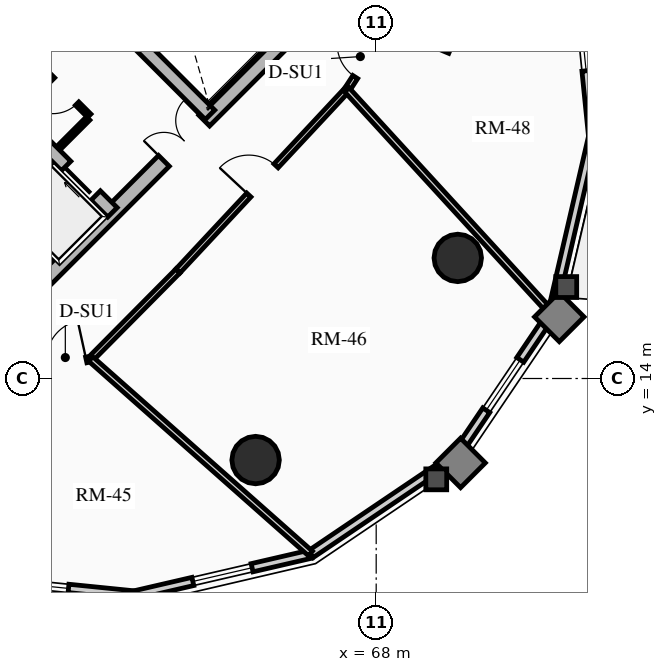
"""IFC4 building model, lengths in metres.
Left out: names, types, materials, properties, quantities, classifications, styles, units other than length and angle.
Written with IfcOpenShell. Run it as: python <this file> out.ifc"""

import sys

from ifc_helpers import new_model, si_unit, direction, frame, frame_2d, origin, origin_2d, place, context, subcontext, project, spatial, rectangle, circle, extrude, source, transform, mapped, element, fill, save


model = new_model("IFC4")
c1 = context("Model", 3, precision=1e-05, world=origin(), true_north=direction((0.0, 1.0)))
c2 = subcontext(c1, "Body", "Model", "MODEL_VIEW")
j1 = project(units=[si_unit("LENGTHUNIT", "METRE"), si_unit("PLANEANGLEUNIT", "RADIAN")], contexts=[c1])
p1 = place(None, origin())
s1 = spatial("IfcSite", under=j1, at=p1, CompositionType="ELEMENT")
p2 = place(p1, origin())
s2 = spatial("IfcBuilding", under=s1, at=p2, CompositionType="ELEMENT")
p3 = place(p2, frame((0.0, 0.0, 151.6)))
s3 = spatial("IfcBuildingStorey", under=s2, at=p3, CompositionType="ELEMENT", Elevation=151.6)
p4 = place(p3, frame((58.561, 15.873, 0.0), z_axis=(0.0, 0.0, 1.0), x_axis=(0.707106781187, 0.707106781187, 0.0)))
e1 = element("IfcWall", 1, at=p4, inside=s3, PredefinedType="SHEAR", context=c2, shape_type="SweptSolid", body=[
    extrude(rectangle(XDim=10.7, YDim=0.4, at=frame_2d((5.35, 0.0))), origin(), (0.0, 0.0, 1.0), 2.91),
])
m1 = source(origin(), c2, "Body", "SweptSolid", [
    extrude(rectangle(XDim=1.5, YDim=2.02, at=frame_2d((0.75, 1.01))), frame((0.0, 0.21, 0.0), z_axis=(0.0, -1.0, 0.0), x_axis=(1.0, 0.0, 0.0)), (0.0, 0.0, 1.0), 0.42),
])
p5 = place(p4, frame((5.45, 0.0, 0.0)))
e2 = element("IfcOpeningElement", 2, at=p5, cuts=e1, PredefinedType="OPENING", context=c2, shape_type="MappedRepresentation", body=[
    mapped(m1, transform((0.0, 0.0, 0.0), x_axis=(1.0, 0.0, 0.0), y_axis=(0.0, 1.0, 0.0), z_axis=(0.0, 0.0, 1.0), scale=1.0)),
])
p6 = place(p3, frame((61.06, 18.373, 0.0), z_axis=(0.0, 0.0, 1.0), x_axis=(-0.707106781187, 0.707106781187, 0.0)))
e3 = element("IfcWall", 3, at=p6, inside=s3, PredefinedType="SHEAR", context=c2, shape_type="SweptSolid", body=[
    extrude(rectangle(XDim=13.7, YDim=0.35, at=frame_2d((6.85, 0.0))), origin(), (0.0, 0.0, 1.0), 2.91),
])
m2 = source(origin(), c2, "Body", "SweptSolid", [
    extrude(rectangle(XDim=1.1, YDim=2.015, at=frame_2d((0.55, 1.007))), frame((0.0, 0.185, 0.0), z_axis=(0.0, -1.0, 0.0), x_axis=(1.0, 0.0, 0.0)), (0.0, 0.0, 1.0), 0.37),
])
p7 = place(p6, frame((4.85, 0.0, 0.0)))
e4 = element("IfcOpeningElement", 4, at=p7, cuts=e3, PredefinedType="OPENING", context=c2, shape_type="MappedRepresentation", body=[
    mapped(m2, transform((0.0, 0.0, 0.0), x_axis=(1.0, 0.0, 0.0), y_axis=(0.0, 1.0, 0.0), z_axis=(0.0, 0.0, 1.0), scale=1.0)),
])
p8 = place(p6, frame((0.625, 0.0, 0.0)))
e5 = element("IfcOpeningElement", 5, at=p8, cuts=e3, PredefinedType="OPENING", context=c2, shape_type="MappedRepresentation", body=[
    mapped(m2, transform((0.0, 0.0, 0.0), x_axis=(1.0, 0.0, 0.0), y_axis=(0.0, 1.0, 0.0), z_axis=(0.0, 0.0, 1.0), scale=1.0)),
])
p9 = place(p6, frame((2.625, 0.0, 0.0)))
e6 = element("IfcOpeningElement", 6, at=p9, cuts=e3, PredefinedType="OPENING", context=c2, shape_type="MappedRepresentation", body=[
    mapped(m2, transform((0.0, 0.0, 0.0), x_axis=(1.0, 0.0, 0.0), y_axis=(0.0, 1.0, 0.0), z_axis=(0.0, 0.0, 1.0), scale=1.0)),
])
m3 = source(origin(), c2, "Body", "SweptSolid", [
    extrude(rectangle(XDim=1.15, YDim=2.02, at=frame_2d((0.575, 1.01))), frame((0.0, 0.185, 0.0), z_axis=(0.0, -1.0, 0.0), x_axis=(1.0, 0.0, 0.0)), (0.0, 0.0, 1.0), 0.37),
])
p10 = place(p6, frame((7.27, 0.0, 0.0)))
e7 = element("IfcOpeningElement", 7, at=p10, cuts=e3, PredefinedType="OPENING", context=c2, shape_type="MappedRepresentation", body=[
    mapped(m3, transform((0.0, 0.0, 0.0), x_axis=(1.0, 0.0, 0.0), y_axis=(0.0, 1.0, 0.0), z_axis=(0.0, 0.0, 1.0), scale=1.0)),
])
p11 = place(p3, frame((63.627, 20.94, 0.0), z_axis=(0.0, 0.0, 1.0), x_axis=(-0.707119496762, 0.707094065383, 0.0)))
e8 = element("IfcWall", 8, at=p11, inside=s3, PredefinedType="SHEAR", context=c2, shape_type="SweptSolid", body=[
    extrude(rectangle(XDim=9.6, YDim=0.35, at=frame_2d((4.8, 0.0))), origin(), (0.0, 0.0, 1.0), 2.91),
])
p12 = place(p11, frame((5.28, 0.0, 0.0)))
e9 = element("IfcOpeningElement", 9, at=p12, cuts=e8, PredefinedType="OPENING", context=c2, shape_type="MappedRepresentation", body=[
    mapped(m3, transform((0.0, 0.0, 0.0), x_axis=(1.0, 0.0, 0.0), y_axis=(0.0, 1.0, 0.0), z_axis=(0.0, 0.0, 1.0), scale=1.0)),
])
for number, where, z_axis, x_axis in (
    (10, (64.827, 11.854, 0.0), (0.0, 0.0, 1.0), (1.0, 0.0, 0.0)),
    (11, (70.146, 17.173, 0.0), (0.0, 0.0, 1.0), (1.0, 0.0, 0.0)),
):
    element("IfcColumn", number, at=place(p3, frame(where, z_axis=z_axis, x_axis=x_axis)), inside=s3, PredefinedType="USERDEFINED", context=c2, shape_type="SweptSolid", body=[
        extrude(circle(Radius=0.625, at=origin_2d()), origin(), (0.0, 0.0, 1.0), 2.91),
    ])
p13 = place(p3, frame((61.633, 8.302, 0.0), z_axis=(0.0, 0.0, 1.0), x_axis=(-0.994959267396, 0.100279889424, 0.0)))
e12 = element("IfcWall", 12, at=p13, inside=s3, PredefinedType="SOLIDWALL", context=c2, shape_type="SweptSolid", body=[
    extrude(rectangle(XDim=5.076, YDim=0.22, at=frame_2d((2.538, 0.0))), origin(), (0.0, 0.0, 1.0), 2.245),
])
m4 = source(origin(), c2, "Body", "SweptSolid", [
    extrude(rectangle(XDim=1.6, YDim=1.3, at=frame_2d((0.8, 0.65))), frame((0.0, 0.12, 0.0), z_axis=(0.0, -1.0, 0.0), x_axis=(1.0, 0.0, 0.0)), (0.0, 0.0, 1.0), 0.24),
])
p14 = place(p13, frame((1.738, 0.0, 0.65)))
e13 = element("IfcOpeningElement", 13, at=p14, cuts=e12, PredefinedType="OPENING", context=c2, shape_type="MappedRepresentation", body=[
    mapped(m4, transform((0.0, 0.0, 0.0), x_axis=(1.0, 0.0, 0.0), y_axis=(0.0, 1.0, 0.0), z_axis=(0.0, 0.0, 1.0), scale=1.0)),
])
p15 = place(p3, frame((66.279, 9.378, 0.0), z_axis=(0.0, 0.0, 1.0), x_axis=(-0.974206226622, -0.225659540039, 0.0)))
e14 = element("IfcWall", 14, at=p15, inside=s3, PredefinedType="SOLIDWALL", context=c2, shape_type="SweptSolid", body=[
    extrude(rectangle(XDim=4.769, YDim=0.22, at=frame_2d((2.385, 0.0))), origin(), (0.0, 0.0, 1.0), 2.245),
])
p16 = place(p15, frame((1.585, 0.0, 0.65)))
e15 = element("IfcOpeningElement", 15, at=p16, cuts=e14, PredefinedType="OPENING", context=c2, shape_type="MappedRepresentation", body=[
    mapped(m4, transform((0.0, 0.0, 0.0), x_axis=(1.0, 0.0, 0.0), y_axis=(0.0, 1.0, 0.0), z_axis=(0.0, 0.0, 1.0), scale=1.0)),
])
p17 = place(p3, frame((70.065, 11.935, 0.0), z_axis=(0.0, 0.0, 1.0), x_axis=(-0.828739009952, -0.559635286042, 0.0)))
e16 = element("IfcWall", 16, at=p17, inside=s3, PredefinedType="SOLIDWALL", context=c2, shape_type="SweptSolid", body=[
    extrude(rectangle(XDim=4.569, YDim=0.22, at=frame_2d((2.284, 0.0))), origin(), (0.0, 0.0, 1.0), 2.245),
])
p18 = place(p3, frame((72.622, 15.721, 0.0), z_axis=(0.0, 0.0, 1.0), x_axis=(-0.559635286042, -0.828739009952, 0.0)))
e17 = element("IfcWall", 17, at=p18, inside=s3, PredefinedType="SOLIDWALL", context=c2, shape_type="SweptSolid", body=[
    extrude(rectangle(XDim=4.569, YDim=0.22, at=frame_2d((2.284, 0.0))), origin(), (0.0, 0.0, 1.0), 2.245),
])
p19 = place(p18, frame((1.484, 0.0, 0.65)))
e18 = element("IfcOpeningElement", 18, at=p19, cuts=e17, PredefinedType="OPENING", context=c2, shape_type="MappedRepresentation", body=[
    mapped(m4, transform((0.0, 0.0, 0.0), x_axis=(1.0, 0.0, 0.0), y_axis=(0.0, 1.0, 0.0), z_axis=(0.0, 0.0, 1.0), scale=1.0)),
])
p20 = place(p3, frame((73.698, 20.367, 0.0), z_axis=(0.0, 0.0, 1.0), x_axis=(-0.225659540039, -0.974206226622, 0.0)))
e19 = element("IfcWall", 19, at=p20, inside=s3, PredefinedType="SOLIDWALL", context=c2, shape_type="SweptSolid", body=[
    extrude(rectangle(XDim=4.769, YDim=0.22, at=frame_2d((2.385, 0.0))), origin(), (0.0, 0.0, 1.0), 2.245),
])
p21 = place(p3, frame((73.189, 25.418, 0.0), z_axis=(0.0, 0.0, 1.0), x_axis=(0.100279889424, -0.994959267396, 0.0)))
e20 = element("IfcWall", 20, at=p21, inside=s3, PredefinedType="SOLIDWALL", context=c2, shape_type="SweptSolid", body=[
    extrude(rectangle(XDim=5.076, YDim=0.22, at=frame_2d((2.538, 0.0))), origin(), (0.0, 0.0, 1.0), 2.245),
])
p22 = place(p21, frame((1.738, 0.0, 0.65)))
e21 = element("IfcOpeningElement", 21, at=p22, cuts=e20, PredefinedType="OPENING", context=c2, shape_type="MappedRepresentation", body=[
    mapped(m4, transform((0.0, 0.0, 0.0), x_axis=(1.0, 0.0, 0.0), y_axis=(0.0, 1.0, 0.0), z_axis=(0.0, 0.0, 1.0), scale=1.0)),
])
p23 = place(p3, frame((58.214, 21.467, 0.0), z_axis=(0.0, 0.0, 1.0), x_axis=(0.707106781187, 0.707106781187, 0.0)))
e22 = element("IfcWall", 22, at=p23, inside=s3, PredefinedType="PARTITIONING", context=c2, shape_type="SweptSolid", body=[
    extrude(rectangle(XDim=3.28, YDim=0.2, at=frame_2d((1.64, 0.0))), origin(), (0.0, 0.0, 1.0), 2.675),
])
m5 = source(origin(), c2, "Body", "SweptSolid", [
    extrude(rectangle(XDim=1.5, YDim=2.02, at=frame_2d((0.75, 1.01))), frame((0.0, 0.11, 0.0), z_axis=(0.0, -1.0, 0.0), x_axis=(1.0, 0.0, 0.0)), (0.0, 0.0, 1.0), 0.22),
])
p24 = place(p23, frame((1.55, 0.0, 0.0)))
e23 = element("IfcOpeningElement", 23, at=p24, cuts=e22, PredefinedType="OPENING", context=c2, shape_type="MappedRepresentation", body=[
    mapped(m5, transform((0.0, 0.0, 0.0), x_axis=(1.0, 0.0, 0.0), y_axis=(0.0, 1.0, 0.0), z_axis=(0.0, 0.0, 1.0), scale=1.0)),
])
p25 = place(p3, frame((60.448, 20.915, 0.0), z_axis=(0.0, 0.0, 1.0), x_axis=(-0.707106781187, 0.707106781187, 0.0)))
e24 = element("IfcWall", 24, at=p25, inside=s3, PredefinedType="PARTITIONING", context=c2, shape_type="SweptSolid", body=[
    extrude(rectangle(XDim=1.87, YDim=0.125, at=frame_2d((0.935, 0.0))), origin(), (0.0, 0.0, 1.0), 2.675),
])
m6 = source(origin(), c2, "Body", "SweptSolid", [
    extrude(rectangle(XDim=0.9, YDim=2.005, at=frame_2d((0.45, 1.002))), frame((0.0, 0.073, 0.0), z_axis=(0.0, -1.0, 0.0), x_axis=(1.0, 0.0, 0.0)), (0.0, 0.0, 1.0), 0.145),
])
p26 = place(p25, frame((0.45, 0.0, 0.0)))
e25 = element("IfcOpeningElement", 25, at=p26, cuts=e24, PredefinedType="OPENING", context=c2, shape_type="MappedRepresentation", body=[
    mapped(m6, transform((0.0, 0.0, 0.0), x_axis=(1.0, 0.0, 0.0), y_axis=(0.0, 1.0, 0.0), z_axis=(0.0, 0.0, 1.0), scale=1.0)),
])
p27 = place(p3, frame((59.643, 20.066, 0.0), z_axis=(0.0, 0.0, 1.0), x_axis=(0.707106781187, 0.707106781187, 0.0)))
e26 = element("IfcWall", 26, at=p27, inside=s3, PredefinedType="PARTITIONING", context=c2, shape_type="SweptSolid", body=[
    extrude(rectangle(XDim=1.1, YDim=0.125, at=frame_2d((0.55, 0.0))), origin(), (0.0, 0.0, 1.0), 2.675),
])
p28 = place(p3, frame((58.963, 14.18, 0.0), z_axis=(0.0, 0.0, 1.0), x_axis=(0.976826524015, 0.214032572243, 0.0)))
e27 = element("IfcWall", 27, at=p28, inside=s3, PredefinedType="PARTITIONING", context=c2, shape_type="SweptSolid", body=[
    extrude(rectangle(XDim=1.562, YDim=0.15, at=frame_2d((0.781, 0.0))), origin(), (0.0, 0.0, 1.0), 2.245),
])
m7 = source(origin(), c2, "Body", "SweptSolid", [
    extrude(rectangle(XDim=1.05, YDim=2.015, at=frame_2d((0.525, 1.007))), frame((0.0, 0.085, 0.0), z_axis=(0.0, -1.0, 0.0), x_axis=(1.0, 0.0, 0.0)), (0.0, 0.0, 1.0), 0.17),
])
p29 = place(p28, frame((0.392, 0.0, 0.0)))
e28 = element("IfcOpeningElement", 28, at=p29, cuts=e27, PredefinedType="OPENING", context=c2, shape_type="MappedRepresentation", body=[
    mapped(m7, transform((0.0, 0.0, 0.0), x_axis=(1.0, 0.0, 0.0), y_axis=(0.0, 1.0, 0.0), z_axis=(0.0, 0.0, 1.0), scale=1.0)),
])
p30 = place(p3, frame((60.488, 14.514, 0.0), z_axis=(0.0, 0.0, 1.0), x_axis=(0.703880260405, 0.71031864611, 0.0)))
e29 = element("IfcWall", 29, at=p30, inside=s3, PredefinedType="PARTITIONING", context=c2, shape_type="SweptSolid", body=[
    extrude(rectangle(XDim=3.261, YDim=0.15, at=frame_2d((1.63, 0.0))), origin(), (0.0, 0.0, 1.0), 2.245),
])
p31 = place(p3, frame((62.784, 16.83, 0.0), z_axis=(0.0, 0.0, 1.0), x_axis=(0.682240832942, 0.731127516831, 0.0)))
e30 = element("IfcWall", 30, at=p31, inside=s3, PredefinedType="PARTITIONING", context=c2, shape_type="SweptSolid", body=[
    extrude(rectangle(XDim=6.517, YDim=0.15, at=frame_2d((3.259, 0.0))), origin(), (0.0, 0.0, 1.0), 2.245),
])
p32 = place(p31, frame((2.734, 0.0, 0.0)))
e31 = element("IfcOpeningElement", 31, at=p32, cuts=e30, PredefinedType="OPENING", context=c2, shape_type="MappedRepresentation", body=[
    mapped(m7, transform((0.0, 0.0, 0.0), x_axis=(1.0, 0.0, 0.0), y_axis=(0.0, 1.0, 0.0), z_axis=(0.0, 0.0, 1.0), scale=1.0)),
])
p33 = place(p3, frame((67.23, 21.595, 0.0), z_axis=(0.0, 0.0, 1.0), x_axis=(0.543687770222, 0.839287560084, 0.0)))
e32 = element("IfcWall", 32, at=p33, inside=s3, PredefinedType="PARTITIONING", context=c2, shape_type="SweptSolid", body=[
    extrude(rectangle(XDim=1.855, YDim=0.15, at=frame_2d((0.927, 0.0))), origin(), (0.0, 0.0, 1.0), 2.245),
])
p34 = place(p33, frame((0.402, 0.0, 0.0)))
e33 = element("IfcOpeningElement", 33, at=p34, cuts=e32, PredefinedType="OPENING", context=c2, shape_type="MappedRepresentation", body=[
    mapped(m7, transform((0.0, 0.0, 0.0), x_axis=(1.0, 0.0, 0.0), y_axis=(0.0, 1.0, 0.0), z_axis=(0.0, 0.0, 1.0), scale=1.0)),
])
p35 = place(p3, frame((60.488, 14.514, 0.0), z_axis=(0.0, 0.0, 1.0), x_axis=(0.748740614849, -0.662863101761, 0.0)))
e34 = element("IfcWall", 34, at=p35, inside=s3, PredefinedType="PARTITIONING", context=c2, shape_type="SweptSolid", body=[
    extrude(rectangle(XDim=7.721, YDim=0.16, at=frame_2d((3.861, 0.0))), origin(), (0.0, 0.0, 1.0), 2.245),
])
p36 = place(p3, frame((67.23, 21.595, 0.0), z_axis=(0.0, 0.0, 1.0), x_axis=(0.67560509773, -0.737263692258, 0.0)))
e35 = element("IfcWall", 35, at=p36, inside=s3, PredefinedType="PARTITIONING", context=c2, shape_type="SweptSolid", body=[
    extrude(rectangle(XDim=7.955, YDim=0.16, at=frame_2d((3.978, 0.0))), origin(), (0.0, 0.0, 1.0), 2.245),
])
p37 = place(p3, frame((68.367, 23.271, 0.0), z_axis=(0.0, 0.0, 1.0), x_axis=(0.922420747941, -0.386186436541, 0.0)))
e36 = element("IfcWall", 36, at=p37, inside=s3, PredefinedType="PARTITIONING", context=c2, shape_type="SweptSolid", body=[
    extrude(rectangle(XDim=1.699, YDim=0.125, at=frame_2d((0.849, 0.0))), origin(), (0.0, 0.0, 1.0), 2.312),
])
m8 = source(origin(), c2, "Body", "SweptSolid", [
    extrude(rectangle(XDim=1.6, YDim=1.3, at=frame_2d((0.8, 0.65))), frame((0.0, 0.03, 0.0), z_axis=(0.0, -1.0, 0.0), x_axis=(1.0, 0.0, 0.0)), (0.0, 0.0, 1.0), 0.06),
])
p38 = place(p14, origin())
e37 = element("IfcWindow", 37, at=p38, inside=s3, PartitioningType="SINGLE_PANEL", PredefinedType="WINDOW", context=c2, shape_type="MappedRepresentation", body=[
    mapped(m8, transform((0.0, 0.0, 0.0), x_axis=(1.0, 0.0, 0.0), y_axis=(0.0, 1.0, 0.0), z_axis=(0.0, 0.0, 1.0), scale=1.0)),
])
fill(e13, e37)
p39 = place(p16, origin())
e38 = element("IfcWindow", 38, at=p39, inside=s3, PartitioningType="SINGLE_PANEL", PredefinedType="WINDOW", context=c2, shape_type="MappedRepresentation", body=[
    mapped(m8, transform((0.0, 0.0, 0.0), x_axis=(1.0, 0.0, 0.0), y_axis=(0.0, 1.0, 0.0), z_axis=(0.0, 0.0, 1.0), scale=1.0)),
])
fill(e15, e38)
p40 = place(p19, origin())
e39 = element("IfcWindow", 39, at=p40, inside=s3, PartitioningType="SINGLE_PANEL", PredefinedType="WINDOW", context=c2, shape_type="MappedRepresentation", body=[
    mapped(m8, transform((0.0, 0.0, 0.0), x_axis=(1.0, 0.0, 0.0), y_axis=(0.0, 1.0, 0.0), z_axis=(0.0, 0.0, 1.0), scale=1.0)),
])
fill(e18, e39)
p41 = place(p22, origin())
e40 = element("IfcWindow", 40, at=p41, inside=s3, PartitioningType="SINGLE_PANEL", PredefinedType="WINDOW", context=c2, shape_type="MappedRepresentation", body=[
    mapped(m8, transform((0.0, 0.0, 0.0), x_axis=(1.0, 0.0, 0.0), y_axis=(0.0, 1.0, 0.0), z_axis=(0.0, 0.0, 1.0), scale=1.0)),
])
fill(e21, e40)
m9 = source(origin(), c2, "Body", "SweptSolid", [
    extrude(rectangle(XDim=1.1, YDim=2.015, at=frame_2d((0.55, 1.007))), frame((0.0, 0.025, 0.0), z_axis=(0.0, -1.0, 0.0), x_axis=(1.0, 0.0, 0.0)), (0.0, 0.0, 1.0), 0.05),
])
p42 = place(p8, origin())
e41 = element("IfcDoor", 41, at=p42, inside=s3, OperationType="SLIDING_TO_RIGHT", PredefinedType="DOOR", context=c2, shape_type="MappedRepresentation", body=[
    mapped(m9, transform((0.0, 0.0, 0.0), x_axis=(1.0, 0.0, 0.0), y_axis=(0.0, 1.0, 0.0), z_axis=(0.0, 0.0, 1.0), scale=1.0)),
])
fill(e5, e41)
m10 = source(origin(), c2, "Body", "SweptSolid", [
    extrude(rectangle(XDim=1.5, YDim=2.02, at=frame_2d((0.75, 1.01))), frame((0.0, 0.025, 0.0), z_axis=(0.0, -1.0, 0.0), x_axis=(1.0, 0.0, 0.0)), (0.0, 0.0, 1.0), 0.05),
])
p43 = place(p5, origin())
e42 = element("IfcDoor", 42, at=p43, inside=s3, OperationType="DOUBLE_DOOR_SINGLE_SWING", PredefinedType="DOOR", context=c2, shape_type="MappedRepresentation", body=[
    mapped(m10, transform((0.0, 0.0, 0.0), x_axis=(1.0, 0.0, 0.0), y_axis=(0.0, 1.0, 0.0), z_axis=(0.0, 0.0, 1.0), scale=1.0)),
])
fill(e2, e42)
p44 = place(p24, origin())
e43 = element("IfcDoor", 43, at=p44, inside=s3, OperationType="DOUBLE_DOOR_SINGLE_SWING", PredefinedType="DOOR", context=c2, shape_type="MappedRepresentation", body=[
    mapped(m10, transform((0.0, 0.0, 0.0), x_axis=(1.0, 0.0, 0.0), y_axis=(0.0, 1.0, 0.0), z_axis=(0.0, 0.0, 1.0), scale=1.0)),
])
fill(e23, e43)
m11 = source(origin(), c2, "Body", "SweptSolid", [
    extrude(rectangle(XDim=0.9, YDim=2.005, at=frame_2d((0.45, 1.002))), frame((0.0, 0.025, 0.0), z_axis=(0.0, -1.0, 0.0), x_axis=(1.0, 0.0, 0.0)), (0.0, 0.0, 1.0), 0.05),
])
p45 = place(p26, origin())
e44 = element("IfcDoor", 44, at=p45, inside=s3, OperationType="SINGLE_SWING_RIGHT", PredefinedType="DOOR", context=c2, shape_type="MappedRepresentation", body=[
    mapped(m11, transform((0.0, 0.0, 0.0), x_axis=(1.0, 0.0, 0.0), y_axis=(0.0, 1.0, 0.0), z_axis=(0.0, 0.0, 1.0), scale=1.0)),
])
fill(e25, e44)
m12 = source(origin(), c2, "Body", "SweptSolid", [
    extrude(rectangle(XDim=1.05, YDim=2.015, at=frame_2d((0.525, 1.007))), frame((0.0, 0.025, 0.0), z_axis=(0.0, -1.0, 0.0), x_axis=(1.0, 0.0, 0.0)), (0.0, 0.0, 1.0), 0.05),
])
p46 = place(p29, origin())
e45 = element("IfcDoor", 45, at=p46, inside=s3, OperationType="SINGLE_SWING_RIGHT", PredefinedType="DOOR", context=c2, shape_type="MappedRepresentation", body=[
    mapped(m12, transform((0.0, 0.0, 0.0), x_axis=(1.0, 0.0, 0.0), y_axis=(0.0, 1.0, 0.0), z_axis=(0.0, 0.0, 1.0), scale=1.0)),
])
fill(e28, e45)
p47 = place(p32, origin())
e46 = element("IfcDoor", 46, at=p47, inside=s3, OperationType="SINGLE_SWING_LEFT", PredefinedType="DOOR", context=c2, shape_type="MappedRepresentation", body=[
    mapped(m12, transform((0.0, 0.0, 0.0), x_axis=(1.0, 0.0, 0.0), y_axis=(0.0, 1.0, 0.0), z_axis=(0.0, 0.0, 1.0), scale=1.0)),
])
fill(e31, e46)
p48 = place(p34, origin())
e47 = element("IfcDoor", 47, at=p48, inside=s3, OperationType="SINGLE_SWING_RIGHT", PredefinedType="DOOR", context=c2, shape_type="MappedRepresentation", body=[
    mapped(m12, transform((0.0, 0.0, 0.0), x_axis=(1.0, 0.0, 0.0), y_axis=(0.0, 1.0, 0.0), z_axis=(0.0, 0.0, 1.0), scale=1.0)),
])
fill(e33, e47)
save(model, sys.argv[1])
